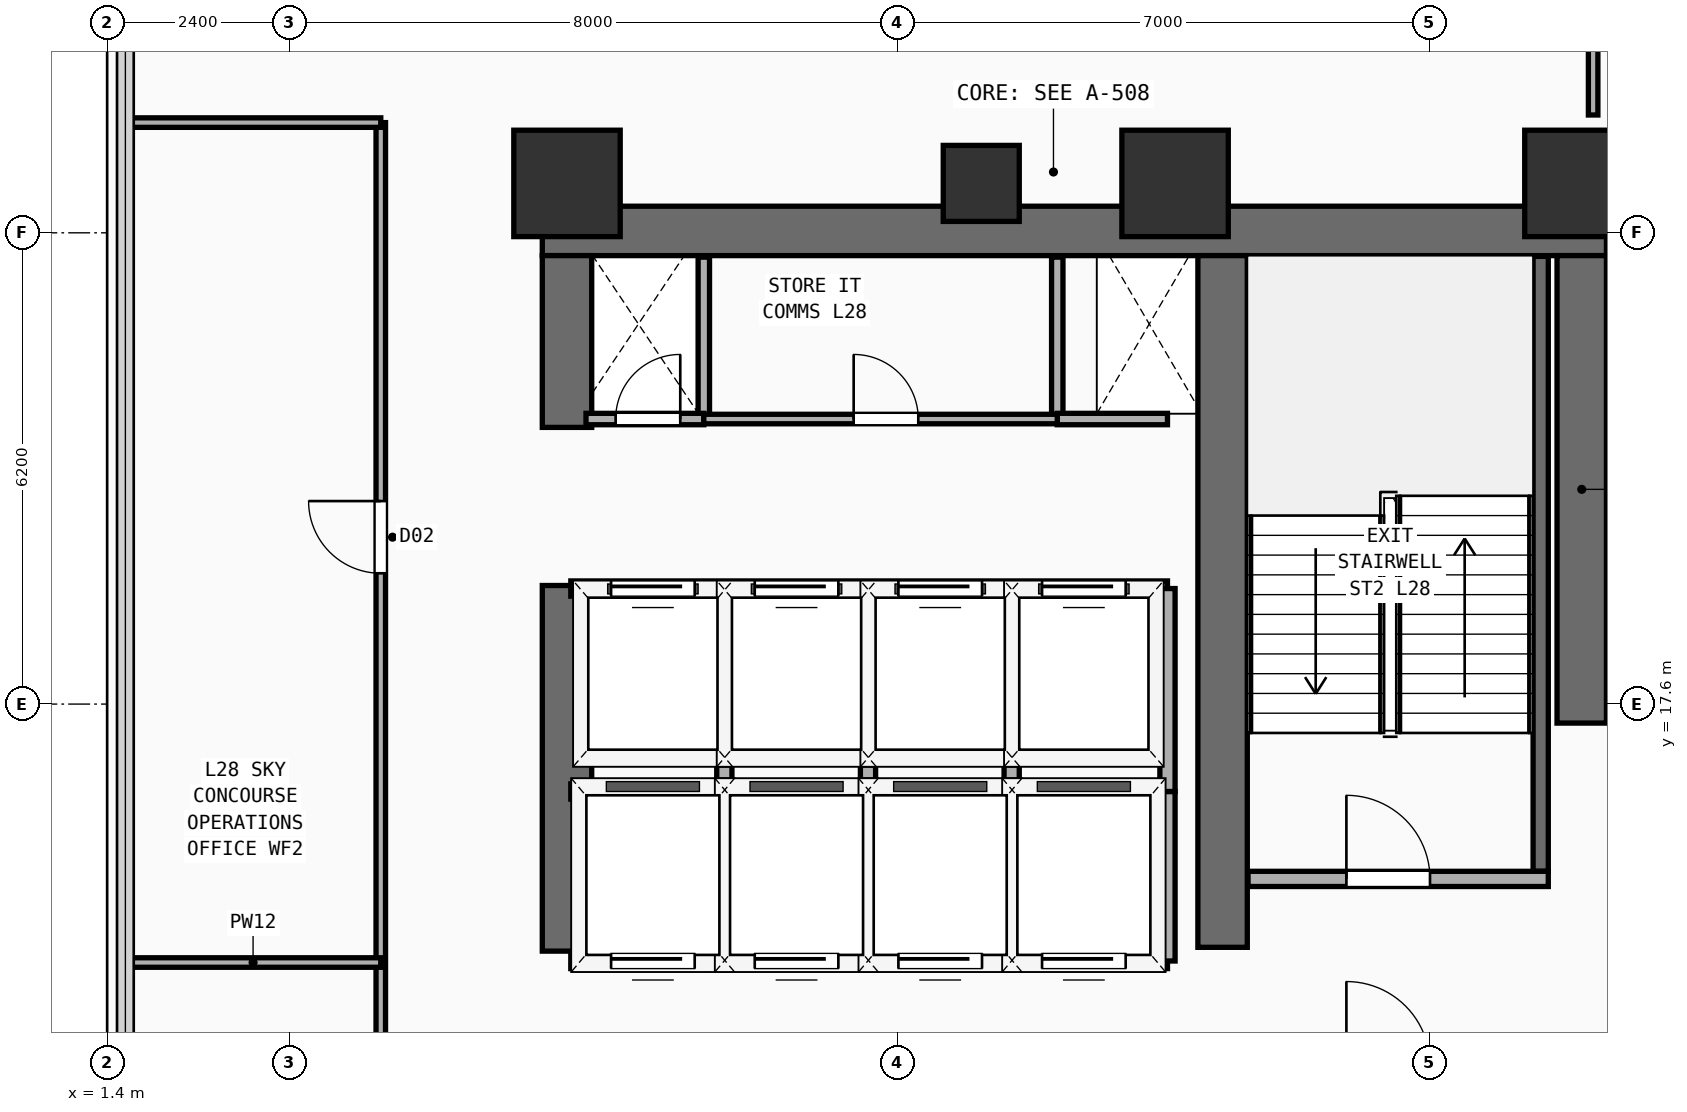
"""IFC4 building model, lengths in metres.
Left out: names, types, materials, properties, quantities, classifications, styles, units other than length and angle.
Written with IfcOpenShell. Run it as: python <this file> out.ifc"""

import sys

from ifc_helpers import new_model, si_unit, direction, frame, frame_2d, origin, origin_2d, place, context, subcontext, project, spatial, rectangle, extrude, element, fill, save


model = new_model("IFC4")
c1 = context("Model", 3, precision=1e-05, world=origin(), true_north=direction((0.0, 1.0)))
c2 = subcontext(c1, "Body", "Model", "MODEL_VIEW")
j1 = project(units=[si_unit("LENGTHUNIT", "METRE"), si_unit("PLANEANGLEUNIT", "RADIAN")], contexts=[c1])
p1 = place(None, origin())
s1 = spatial("IfcSite", under=j1, at=p1, CompositionType="ELEMENT")
p2 = place(p1, origin())
s2 = spatial("IfcBuilding", under=s1, at=p2, CompositionType="ELEMENT")
p3 = place(p2, frame((0.0, 0.0, 110.7)))
s3 = spatial("IfcBuildingStorey", under=s2, at=p3, CompositionType="ELEMENT", Elevation=110.7)
p4 = place(p3, frame((7.125, 23.825, 0.0), z_axis=(0.0, 0.0, 1.0), x_axis=(1.0, 0.0, 0.0)))
e1 = element("IfcWall", 1, at=p4, inside=s3, PredefinedType="SHEAR", context=c2, shape_type="SweptSolid", body=[
    extrude(rectangle(XDim=14.0, YDim=0.65, at=frame_2d((7.0, 0.0))), origin(), (0.0, 0.0, 1.0), 3.54),
])
p5 = place(p3, frame((7.45, 14.35, 0.0), z_axis=(0.0, 0.0, 1.0), x_axis=(0.0, 1.0, 0.0)))
e2 = element("IfcWall", 2, at=p5, inside=s3, PredefinedType="SHEAR", context=c2, shape_type="SweptSolid", body=[
    extrude(rectangle(XDim=4.81, YDim=0.65, at=frame_2d((2.405, 0.0))), origin(), (0.0, 0.0, 1.0), 3.54),
])
p6 = place(p3, frame((7.45, 21.24, 0.0), z_axis=(0.0, 0.0, 1.0), x_axis=(0.0, 1.0, 0.0)))
e3 = element("IfcWall", 3, at=p6, inside=s3, PredefinedType="SHEAR", context=c2, shape_type="SweptSolid", body=[
    extrude(rectangle(XDim=2.26, YDim=0.65, at=frame_2d((1.13, 0.0))), origin(), (0.0, 0.0, 1.0), 3.54),
])
p7 = place(p3, frame((20.8, 17.35, 0.0), z_axis=(0.0, 0.0, 1.0), x_axis=(0.0, 1.0, 0.0)))
e4 = element("IfcWall", 4, at=p7, inside=s3, PredefinedType="SHEAR", context=c2, shape_type="SweptSolid", body=[
    extrude(rectangle(XDim=6.15, YDim=0.65, at=frame_2d((3.075, 0.0))), origin(), (0.0, 0.0, 1.0), 3.54),
])
p8 = place(p3, frame((16.075, 14.4, 0.0), z_axis=(0.0, 0.0, 1.0), x_axis=(0.0, 1.0, 0.0)))
e5 = element("IfcWall", 5, at=p8, inside=s3, PredefinedType="SHEAR", context=c2, shape_type="SweptSolid", body=[
    extrude(rectangle(XDim=9.1, YDim=0.65, at=frame_2d((4.55, 0.0))), origin(), (0.0, 0.0, 1.0), 3.54),
])
for number, where, z_axis, x_axis in (
    (6, (7.45, 24.45, 0.0), (0.0, 0.0, 1.0), (1.0, 0.0, 0.0)),
    (7, (15.45, 24.45, 0.0), (0.0, 0.0, 1.0), (1.0, 0.0, 0.0)),
    (8, (20.75, 24.45, 0.0), (0.0, 0.0, 1.0), (1.0, 0.0, 0.0)),
):
    element("IfcColumn", number, at=place(p3, frame(where, z_axis=z_axis, x_axis=x_axis)), inside=s3, PredefinedType="COLUMN", context=c2, shape_type="SweptSolid", body=[
        extrude(rectangle(XDim=1.4, YDim=1.4, at=origin_2d()), origin(), (0.0, 0.0, 1.0), 3.54),
    ])
p9 = place(p3, frame((12.9, 24.45, 0.0), z_axis=(0.0, 0.0, 1.0), x_axis=(1.0, 0.0, 0.0)))
e9 = element("IfcColumn", 9, at=p9, inside=s3, PredefinedType="COLUMN", context=c2, shape_type="SweptSolid", body=[
    extrude(rectangle(XDim=1.0, YDim=1.0, at=origin_2d()), origin(), (0.0, 0.0, 1.0), 3.54),
])
p10 = place(p3, frame((20.26, 15.4, 0.0), z_axis=(0.0, 0.0, 1.0), x_axis=(0.0, 1.0, 0.0)))
e10 = element("IfcWall", 10, at=p10, inside=s3, PredefinedType="SHEAR", context=c2, shape_type="SweptSolid", body=[
    extrude(rectangle(XDim=8.09, YDim=0.2, at=frame_2d((4.045, 0.0))), origin(), (0.0, 0.0, 1.0), 3.54),
])
p11 = place(p3, frame((16.41, 15.3, 0.0), z_axis=(0.0, 0.0, 1.0), x_axis=(1.0, 0.0, 0.0)))
e11 = element("IfcWall", 11, at=p11, inside=s3, PredefinedType="PARTITIONING", context=c2, shape_type="SweptSolid", body=[
    extrude(rectangle(XDim=3.95, YDim=0.2, at=frame_2d((1.975, 0.0))), origin(), (0.0, 0.0, 1.0), 3.54),
])
p12 = place(p11, frame((1.294, 0.0, 0.0)))
e12 = element("IfcOpeningElement", 12, at=p12, cuts=e11, PredefinedType="OPENING", context=c2, shape_type="SweptSolid", body=[
    extrude(rectangle(XDim=1.1, YDim=2.2, at=frame_2d((0.55, 1.1))), frame((0.0, 0.11, 0.0), z_axis=(0.0, -1.0, 0.0), x_axis=(1.0, 0.0, 0.0)), (0.0, 0.0, 1.0), 0.22),
])
p13 = place(p3, frame((7.5, 14.22, 0.0), z_axis=(0.0, 0.0, 1.0), x_axis=(1.0, 0.0, 0.0)))
e13 = element("IfcWall", 13, at=p13, inside=s3, PredefinedType="PARTITIONING", context=c2, shape_type="SweptSolid", body=[
    extrude(rectangle(XDim=7.85, YDim=0.2, at=frame_2d((3.925, 0.0))), origin(), (0.0, 0.0, 1.0), 3.54),
])
p14 = place(p13, frame((0.53, 0.0, 0.0)))
e14 = element("IfcOpeningElement", 14, at=p14, cuts=e13, PredefinedType="OPENING", context=c2, shape_type="SweptSolid", body=[
    extrude(rectangle(XDim=1.1, YDim=2.2, at=frame_2d((0.55, 1.1))), frame((0.0, 0.11, 0.0), z_axis=(0.0, -1.0, 0.0), x_axis=(1.0, 0.0, 0.0)), (0.0, 0.0, 1.0), 0.22),
])
p15 = place(p13, frame((2.42, 0.0, 0.0)))
e15 = element("IfcOpeningElement", 15, at=p15, cuts=e13, PredefinedType="OPENING", context=c2, shape_type="SweptSolid", body=[
    extrude(rectangle(XDim=1.1, YDim=2.2, at=frame_2d((0.55, 1.1))), frame((0.0, 0.11, 0.0), z_axis=(0.0, -1.0, 0.0), x_axis=(1.0, 0.0, 0.0)), (0.0, 0.0, 1.0), 0.22),
])
p16 = place(p13, frame((4.31, 0.0, 0.0)))
e16 = element("IfcOpeningElement", 16, at=p16, cuts=e13, PredefinedType="OPENING", context=c2, shape_type="SweptSolid", body=[
    extrude(rectangle(XDim=1.1, YDim=2.2, at=frame_2d((0.55, 1.1))), frame((0.0, 0.11, 0.0), z_axis=(0.0, -1.0, 0.0), x_axis=(1.0, 0.0, 0.0)), (0.0, 0.0, 1.0), 0.22),
])
p17 = place(p13, frame((6.2, 0.0, 0.0)))
e17 = element("IfcOpeningElement", 17, at=p17, cuts=e13, PredefinedType="OPENING", context=c2, shape_type="SweptSolid", body=[
    extrude(rectangle(XDim=1.1, YDim=2.2, at=frame_2d((0.55, 1.1))), frame((0.0, 0.11, 0.0), z_axis=(0.0, -1.0, 0.0), x_axis=(1.0, 0.0, 0.0)), (0.0, 0.0, 1.0), 0.22),
])
p18 = place(p3, frame((7.5, 16.45, 0.0), z_axis=(0.0, 0.0, 1.0), x_axis=(1.0, 0.0, 0.0)))
e18 = element("IfcWall", 18, at=p18, inside=s3, PredefinedType="PARTITIONING", context=c2, shape_type="SweptSolid", body=[
    extrude(rectangle(XDim=7.85, YDim=0.2, at=frame_2d((3.925, 0.0))), origin(), (0.0, 0.0, 1.0), 3.54),
])
for number, where, z_axis, x_axis in (
    (19, (15.35, 14.22, 0.0), (0.0, 0.0, 1.0), (0.0, 1.0, 0.0)),
    (20, (9.52, 14.22, 0.0), (0.0, 0.0, 1.0), (0.0, 1.0, 0.0)),
    (21, (11.41, 14.22, 0.0), (0.0, 0.0, 1.0), (0.0, 1.0, 0.0)),
    (22, (13.3, 14.22, 0.0), (0.0, 0.0, 1.0), (0.0, 1.0, 0.0)),
):
    element("IfcWall", number, at=place(p3, frame(where, z_axis=z_axis, x_axis=x_axis)), inside=s3, PredefinedType="PARTITIONING", context=c2, shape_type="SweptSolid", body=[
        extrude(rectangle(XDim=2.23, YDim=0.2, at=frame_2d((1.115, 0.0))), origin(), (0.0, 0.0, 1.0), 3.54),
    ])
p19 = place(p3, frame((7.5, 19.12, 0.0), z_axis=(0.0, 0.0, 1.0), x_axis=(1.0, 0.0, 0.0)))
e23 = element("IfcWall", 23, at=p19, inside=s3, PredefinedType="PARTITIONING", context=c2, shape_type="SweptSolid", body=[
    extrude(rectangle(XDim=7.85, YDim=0.2, at=frame_2d((3.925, 0.0))), origin(), (0.0, 0.0, 1.0), 3.54),
])
p20 = place(p19, frame((0.53, 0.0, 0.0)))
e24 = element("IfcOpeningElement", 24, at=p20, cuts=e23, PredefinedType="OPENING", context=c2, shape_type="SweptSolid", body=[
    extrude(rectangle(XDim=1.1, YDim=2.2, at=frame_2d((0.55, 1.1))), frame((0.0, 0.11, 0.0), z_axis=(0.0, -1.0, 0.0), x_axis=(1.0, 0.0, 0.0)), (0.0, 0.0, 1.0), 0.22),
])
p21 = place(p19, frame((2.42, 0.0, 0.0)))
e25 = element("IfcOpeningElement", 25, at=p21, cuts=e23, PredefinedType="OPENING", context=c2, shape_type="SweptSolid", body=[
    extrude(rectangle(XDim=1.1, YDim=2.2, at=frame_2d((0.55, 1.1))), frame((0.0, 0.11, 0.0), z_axis=(0.0, -1.0, 0.0), x_axis=(1.0, 0.0, 0.0)), (0.0, 0.0, 1.0), 0.22),
])
p22 = place(p19, frame((4.31, 0.0, 0.0)))
e26 = element("IfcOpeningElement", 26, at=p22, cuts=e23, PredefinedType="OPENING", context=c2, shape_type="SweptSolid", body=[
    extrude(rectangle(XDim=1.1, YDim=2.2, at=frame_2d((0.55, 1.1))), frame((0.0, 0.11, 0.0), z_axis=(0.0, -1.0, 0.0), x_axis=(1.0, 0.0, 0.0)), (0.0, 0.0, 1.0), 0.22),
])
p23 = place(p19, frame((6.2, 0.0, 0.0)))
e27 = element("IfcOpeningElement", 27, at=p23, cuts=e23, PredefinedType="OPENING", context=c2, shape_type="SweptSolid", body=[
    extrude(rectangle(XDim=1.1, YDim=2.2, at=frame_2d((0.55, 1.1))), frame((0.0, 0.11, 0.0), z_axis=(0.0, -1.0, 0.0), x_axis=(1.0, 0.0, 0.0)), (0.0, 0.0, 1.0), 0.22),
])
for number, where, z_axis, x_axis in (
    (28, (15.35, 16.45, 0.0), (0.0, 0.0, 1.0), (0.0, 1.0, 0.0)),
    (29, (9.52, 16.45, 0.0), (0.0, 0.0, 1.0), (0.0, 1.0, 0.0)),
    (30, (11.41, 16.45, 0.0), (0.0, 0.0, 1.0), (0.0, 1.0, 0.0)),
    (31, (13.3, 16.45, 0.0), (0.0, 0.0, 1.0), (0.0, 1.0, 0.0)),
):
    element("IfcWall", number, at=place(p3, frame(where, z_axis=z_axis, x_axis=x_axis)), inside=s3, PredefinedType="PARTITIONING", context=c2, shape_type="SweptSolid", body=[
        extrude(rectangle(XDim=2.67, YDim=0.2, at=frame_2d((1.335, 0.0))), origin(), (0.0, 0.0, 1.0), 3.54),
    ])
for number, where, z_axis, x_axis in (
    (32, (9.25, 21.35, 0.0), (0.0, 0.0, 1.0), (0.0, 1.0, 0.0)),
    (33, (13.9, 21.35, 0.0), (0.0, 0.0, 1.0), (0.0, 1.0, 0.0)),
):
    element("IfcWall", number, at=place(p3, frame(where, z_axis=z_axis, x_axis=x_axis)), inside=s3, PredefinedType="PARTITIONING", context=c2, shape_type="SweptSolid", body=[
        extrude(rectangle(XDim=2.13, YDim=0.15, at=frame_2d((1.065, 0.0))), origin(), (0.0, 0.0, 1.0), 3.54),
    ])
p24 = place(p3, frame((7.7, 21.35, 0.0), z_axis=(0.0, 0.0, 1.0), x_axis=(1.0, 0.0, 0.0)))
e34 = element("IfcWall", 34, at=p24, inside=s3, PredefinedType="PARTITIONING", context=c2, shape_type="SweptSolid", body=[
    extrude(rectangle(XDim=1.55, YDim=0.15, at=frame_2d((0.775, 0.0))), origin(), (0.0, 0.0, 1.0), 3.54),
])
p25 = place(p24, frame((0.39, 0.0, 0.0)))
e35 = element("IfcOpeningElement", 35, at=p25, cuts=e34, PredefinedType="OPENING", context=c2, shape_type="SweptSolid", body=[
    extrude(rectangle(XDim=0.85, YDim=2.15, at=frame_2d((0.425, 1.075))), frame((0.0, 0.085, 0.0), z_axis=(0.0, -1.0, 0.0), x_axis=(1.0, 0.0, 0.0)), (0.0, 0.0, 1.0), 0.17),
])
p26 = place(p3, frame((13.9, 21.35, 0.0), z_axis=(0.0, 0.0, 1.0), x_axis=(1.0, 0.0, 0.0)))
e36 = element("IfcWall", 36, at=p26, inside=s3, PredefinedType="PARTITIONING", context=c2, shape_type="SweptSolid", body=[
    extrude(rectangle(XDim=1.45, YDim=0.15, at=frame_2d((0.725, 0.0))), origin(), (0.0, 0.0, 1.0), 3.54),
])
p27 = place(p3, frame((9.25, 21.35, 0.0), z_axis=(0.0, 0.0, 1.0), x_axis=(1.0, 0.0, 0.0)))
e37 = element("IfcWall", 37, at=p27, inside=s3, PredefinedType="PARTITIONING", context=c2, shape_type="SweptSolid", body=[
    extrude(rectangle(XDim=4.65, YDim=0.125, at=frame_2d((2.325, 0.0))), origin(), (0.0, 0.0, 1.0), 3.54),
])
p28 = place(p27, frame((1.971, 0.0, 0.0)))
e38 = element("IfcOpeningElement", 38, at=p28, cuts=e37, PredefinedType="OPENING", context=c2, shape_type="SweptSolid", body=[
    extrude(rectangle(XDim=0.85, YDim=2.15, at=frame_2d((0.425, 1.075))), frame((0.0, 0.073, 0.0), z_axis=(0.0, -1.0, 0.0), x_axis=(1.0, 0.0, 0.0)), (0.0, 0.0, 1.0), 0.145),
])
p29 = place(p3, frame((5.0, 7.5, 0.0), z_axis=(0.0, 0.0, 1.0), x_axis=(0.0, 1.0, 0.0)))
e39 = element("IfcWall", 39, at=p29, inside=s3, PredefinedType="PARTITIONING", context=c2, shape_type="SweptSolid", body=[
    extrude(rectangle(XDim=17.75, YDim=0.125, at=frame_2d((8.875, 0.0))), origin(), (0.0, 0.0, 1.0), 3.54),
])
p30 = place(p29, frame((2.85, 0.0, 0.0)))
e40 = element("IfcOpeningElement", 40, at=p30, cuts=e39, PredefinedType="OPENING", context=c2, shape_type="SweptSolid", body=[
    extrude(rectangle(XDim=0.95, YDim=2.15, at=frame_2d((0.475, 1.075))), frame((0.0, 0.073, 0.0), z_axis=(0.0, -1.0, 0.0), x_axis=(1.0, 0.0, 0.0)), (0.0, 0.0, 1.0), 0.145),
])
p31 = place(p29, frame((11.821, 0.0, 0.0)))
e41 = element("IfcOpeningElement", 41, at=p31, cuts=e39, PredefinedType="OPENING", context=c2, shape_type="SweptSolid", body=[
    extrude(rectangle(XDim=0.95, YDim=2.15, at=frame_2d((0.475, 1.075))), frame((0.0, 0.073, 0.0), z_axis=(0.0, -1.0, 0.0), x_axis=(1.0, 0.0, 0.0)), (0.0, 0.0, 1.0), 0.145),
])
for number, where, z_axis, x_axis in (
    (42, (1.64, 25.25, 0.0), (0.0, 0.0, 1.0), (1.0, 0.0, 0.0)),
    (43, (1.64, 14.2, 0.0), (0.0, 0.0, 1.0), (1.0, 0.0, 0.0)),
):
    element("IfcWall", number, at=place(p3, frame(where, z_axis=z_axis, x_axis=x_axis)), inside=s3, PredefinedType="PARTITIONING", context=c2, shape_type="SweptSolid", body=[
        extrude(rectangle(XDim=3.36, YDim=0.125, at=frame_2d((1.68, 0.0))), origin(), (0.0, 0.0, 1.0), 3.54),
    ])
p32 = place(p3, frame((20.95, 25.35, 0.0), z_axis=(0.0, 0.0, 1.0), x_axis=(0.0, 1.0, 0.0)))
e44 = element("IfcWall", 44, at=p32, inside=s3, PredefinedType="PARTITIONING", context=c2, shape_type="SweptSolid", body=[
    extrude(rectangle(XDim=9.25, YDim=0.125, at=frame_2d((4.625, 0.0))), origin(), (0.0, 0.0, 1.0), 3.54),
])
p33 = place(p32, frame((3.833, 0.0, 0.0)))
e45 = element("IfcOpeningElement", 45, at=p33, cuts=e44, PredefinedType="OPENING", context=c2, shape_type="SweptSolid", body=[
    extrude(rectangle(XDim=0.85, YDim=2.15, at=frame_2d((0.425, 1.075))), frame((0.0, 0.073, 0.0), z_axis=(0.0, -1.0, 0.0), x_axis=(1.0, 0.0, 0.0)), (0.0, 0.0, 1.0), 0.145),
])
p34 = place(p12, origin())
e46 = element("IfcDoor", 46, at=p34, inside=s3, OperationType="SINGLE_SWING_LEFT", PredefinedType="DOOR", context=c2, shape_type="SweptSolid", body=[
    extrude(rectangle(XDim=1.1, YDim=2.2, at=frame_2d((0.55, 1.1))), frame((0.0, 0.025, 0.0), z_axis=(0.0, -1.0, 0.0), x_axis=(1.0, 0.0, 0.0)), (0.0, 0.0, 1.0), 0.05),
])
fill(e12, e46)
p35 = place(p14, frame((1.1, 0.0, 0.0), z_axis=(0.0, 0.0, 1.0), x_axis=(-1.0, 0.0, 0.0)))
e47 = element("IfcDoor", 47, at=p35, inside=s3, OperationType="SLIDING_TO_LEFT", PredefinedType="DOOR", context=c2, shape_type="SweptSolid", body=[
    extrude(rectangle(XDim=1.1, YDim=2.2, at=frame_2d((0.55, 1.1))), frame((0.0, 0.025, 0.0), z_axis=(0.0, -1.0, 0.0), x_axis=(1.0, 0.0, 0.0)), (0.0, 0.0, 1.0), 0.05),
])
fill(e14, e47)
p36 = place(p15, frame((1.1, 0.0, 0.0), z_axis=(0.0, 0.0, 1.0), x_axis=(-1.0, 0.0, 0.0)))
e48 = element("IfcDoor", 48, at=p36, inside=s3, OperationType="SLIDING_TO_LEFT", PredefinedType="DOOR", context=c2, shape_type="SweptSolid", body=[
    extrude(rectangle(XDim=1.1, YDim=2.2, at=frame_2d((0.55, 1.1))), frame((0.0, 0.025, 0.0), z_axis=(0.0, -1.0, 0.0), x_axis=(1.0, 0.0, 0.0)), (0.0, 0.0, 1.0), 0.05),
])
fill(e15, e48)
p37 = place(p16, frame((1.1, 0.0, 0.0), z_axis=(0.0, 0.0, 1.0), x_axis=(-1.0, 0.0, 0.0)))
e49 = element("IfcDoor", 49, at=p37, inside=s3, OperationType="SLIDING_TO_LEFT", PredefinedType="DOOR", context=c2, shape_type="SweptSolid", body=[
    extrude(rectangle(XDim=1.1, YDim=2.2, at=frame_2d((0.55, 1.1))), frame((0.0, 0.025, 0.0), z_axis=(0.0, -1.0, 0.0), x_axis=(1.0, 0.0, 0.0)), (0.0, 0.0, 1.0), 0.05),
])
fill(e16, e49)
p38 = place(p17, frame((1.1, 0.0, 0.0), z_axis=(0.0, 0.0, 1.0), x_axis=(-1.0, 0.0, 0.0)))
e50 = element("IfcDoor", 50, at=p38, inside=s3, OperationType="SLIDING_TO_LEFT", PredefinedType="DOOR", context=c2, shape_type="SweptSolid", body=[
    extrude(rectangle(XDim=1.1, YDim=2.2, at=frame_2d((0.55, 1.1))), frame((0.0, 0.025, 0.0), z_axis=(0.0, -1.0, 0.0), x_axis=(1.0, 0.0, 0.0)), (0.0, 0.0, 1.0), 0.05),
])
fill(e17, e50)
p39 = place(p20, origin())
e51 = element("IfcDoor", 51, at=p39, inside=s3, OperationType="SLIDING_TO_LEFT", PredefinedType="DOOR", context=c2, shape_type="SweptSolid", body=[
    extrude(rectangle(XDim=1.1, YDim=2.2, at=frame_2d((0.55, 1.1))), frame((0.0, 0.025, 0.0), z_axis=(0.0, -1.0, 0.0), x_axis=(1.0, 0.0, 0.0)), (0.0, 0.0, 1.0), 0.05),
])
fill(e24, e51)
p40 = place(p21, origin())
e52 = element("IfcDoor", 52, at=p40, inside=s3, OperationType="SLIDING_TO_LEFT", PredefinedType="DOOR", context=c2, shape_type="SweptSolid", body=[
    extrude(rectangle(XDim=1.1, YDim=2.2, at=frame_2d((0.55, 1.1))), frame((0.0, 0.025, 0.0), z_axis=(0.0, -1.0, 0.0), x_axis=(1.0, 0.0, 0.0)), (0.0, 0.0, 1.0), 0.05),
])
fill(e25, e52)
p41 = place(p22, origin())
e53 = element("IfcDoor", 53, at=p41, inside=s3, OperationType="SLIDING_TO_LEFT", PredefinedType="DOOR", context=c2, shape_type="SweptSolid", body=[
    extrude(rectangle(XDim=1.1, YDim=2.2, at=frame_2d((0.55, 1.1))), frame((0.0, 0.025, 0.0), z_axis=(0.0, -1.0, 0.0), x_axis=(1.0, 0.0, 0.0)), (0.0, 0.0, 1.0), 0.05),
])
fill(e26, e53)
p42 = place(p23, origin())
e54 = element("IfcDoor", 54, at=p42, inside=s3, OperationType="SLIDING_TO_LEFT", PredefinedType="DOOR", context=c2, shape_type="SweptSolid", body=[
    extrude(rectangle(XDim=1.1, YDim=2.2, at=frame_2d((0.55, 1.1))), frame((0.0, 0.025, 0.0), z_axis=(0.0, -1.0, 0.0), x_axis=(1.0, 0.0, 0.0)), (0.0, 0.0, 1.0), 0.05),
])
fill(e27, e54)
p43 = place(p25, origin())
e55 = element("IfcDoor", 55, at=p43, inside=s3, OperationType="SINGLE_SWING_RIGHT", PredefinedType="DOOR", context=c2, shape_type="SweptSolid", body=[
    extrude(rectangle(XDim=0.85, YDim=2.15, at=frame_2d((0.425, 1.075))), frame((0.0, 0.025, 0.0), z_axis=(0.0, -1.0, 0.0), x_axis=(1.0, 0.0, 0.0)), (0.0, 0.0, 1.0), 0.05),
])
fill(e35, e55)
p44 = place(p28, origin())
e56 = element("IfcDoor", 56, at=p44, inside=s3, OperationType="SINGLE_SWING_LEFT", PredefinedType="DOOR", context=c2, shape_type="SweptSolid", body=[
    extrude(rectangle(XDim=0.85, YDim=2.15, at=frame_2d((0.425, 1.075))), frame((0.0, 0.025, 0.0), z_axis=(0.0, -1.0, 0.0), x_axis=(1.0, 0.0, 0.0)), (0.0, 0.0, 1.0), 0.05),
])
fill(e38, e56)
p45 = place(p31, origin())
e57 = element("IfcDoor", 57, at=p45, inside=s3, OperationType="SINGLE_SWING_RIGHT", PredefinedType="DOOR", context=c2, shape_type="SweptSolid", body=[
    extrude(rectangle(XDim=0.95, YDim=2.15, at=frame_2d((0.475, 1.075))), frame((0.0, 0.025, 0.0), z_axis=(0.0, -1.0, 0.0), x_axis=(1.0, 0.0, 0.0)), (0.0, 0.0, 1.0), 0.05),
])
fill(e41, e57)
save(model, sys.argv[1])
